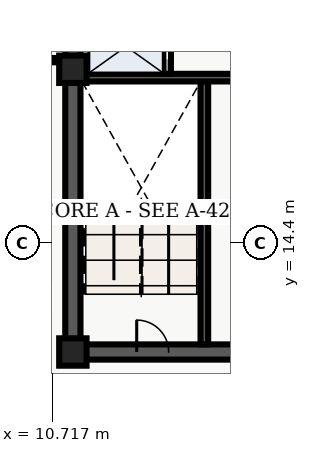
"""IFC4 building model, lengths in metres.
Left out: names, types, materials, properties, quantities, classifications, styles, units other than length and angle.
Written with IfcOpenShell. Run it as: python <this file> out.ifc"""

import sys

from ifc_helpers import new_model, entity, si_unit, converted_unit, direction, frame, origin_with_axes, origin_2d_with_axis, place, context, subcontext, project, spatial, polyline, rectangle, outline, extrude, element, fill, save


model = new_model("IFC4")
c1 = context("Model", 3, precision=1e-05, world=origin_with_axes(), true_north=direction((0.0, 1.0)))
c2 = subcontext(c1, "Body", "Model", "MODEL_VIEW")
j1 = project(units=[si_unit("LENGTHUNIT", "METRE"), converted_unit("PLANEANGLEUNIT", "DEGREE", entity("IfcPlaneAngleMeasure", 0.017), si_unit("PLANEANGLEUNIT", "RADIAN"), dimensions=[0, 0, 0, 0, 0, 0, 0])], contexts=[c1])
p1 = place(None, origin_with_axes())
s1 = spatial("IfcSite", under=j1, at=p1, CompositionType="ELEMENT")
p2 = place(p1, origin_with_axes())
s2 = spatial("IfcBuilding", under=s1, at=p2, CompositionType="ELEMENT")
p3 = place(p2, frame((0.0, 0.0, 200.4), z_axis=(0.0, 0.0, 1.0), x_axis=(1.0, 0.0, 0.0)))
s3 = spatial("IfcBuildingStorey", under=s2, at=p3, CompositionType="ELEMENT", Elevation=200.4)
p4 = place(p3, frame((11.4, 10.8, 0.0), z_axis=(0.0, 0.0, 1.0), x_axis=(0.0, 1.0, 0.0)))
e1 = element("IfcWall", 1, at=p4, inside=s3, PredefinedType="SHEAR", context=c2, shape_type="SweptSolid", body=[
    extrude(outline(polyline([(0.0, -0.25), (27.0, -0.25), (27.0, 0.25), (0.0, 0.25), (0.0, -0.25)])), origin_with_axes(), (0.0, 0.0, 1.0), 3.66),
])
p5 = place(p3, frame((11.4, 10.8, 0.0), z_axis=(0.0, 0.0, 1.0), x_axis=(1.0, 0.0, 0.0)))
e2 = element("IfcWall", 2, at=p5, inside=s3, PredefinedType="SHEAR", context=c2, shape_type="SweptSolid", body=[
    extrude(outline(polyline([(0.0, -0.25), (7.2, -0.25), (7.2, 0.25), (0.0, 0.25), (0.0, -0.25)])), origin_with_axes(), (0.0, 0.0, 1.0), 3.66),
])
p6 = place(p5, frame((2.625, 0.0, 0.0), z_axis=(0.0, 0.0, 1.0), x_axis=(1.0, 0.0, 0.0)))
e3 = element("IfcOpeningElement", 3, at=p6, cuts=e2, PredefinedType="OPENING", context=c2, shape_type="SweptSolid", body=[
    extrude(rectangle(XDim=1.05, YDim=0.52, at=origin_2d_with_axis()), origin_with_axes(), (0.0, 0.0, 1.0), 2.15),
])
p7 = place(p3, frame((15.725, 11.05, 0.0), z_axis=(0.0, 0.0, 1.0), x_axis=(0.0, 1.0, 0.0)))
e4 = element("IfcWall", 4, at=p7, inside=s3, PredefinedType="SHEAR", context=c2, shape_type="SweptSolid", body=[
    extrude(outline(polyline([(0.0, -0.125), (8.65, -0.125), (8.65, 0.125), (0.0, 0.125), (0.0, -0.125)])), origin_with_axes(), (0.0, 0.0, 1.0), 3.66),
])
p8 = place(p3, frame((11.65, 19.825, 0.0), z_axis=(0.0, 0.0, 1.0), x_axis=(1.0, 0.0, 0.0)))
e5 = element("IfcWall", 5, at=p8, inside=s3, PredefinedType="SHEAR", context=c2, shape_type="SweptSolid", body=[
    extrude(outline(polyline([(0.0, -0.125), (6.7, -0.125), (6.7, 0.125), (0.0, 0.125), (0.0, -0.125)])), origin_with_axes(), (0.0, 0.0, 1.0), 3.66),
])
p9 = place(p3, frame((14.5, 19.95, 0.0), z_axis=(0.0, 0.0, 1.0), x_axis=(0.0, 1.0, 0.0)))
e6 = element("IfcWall", 6, at=p9, inside=s3, PredefinedType="SOLIDWALL", context=c2, shape_type="SweptSolid", body=[
    extrude(outline(polyline([(0.0, -0.125), (6.25, -0.125), (6.25, 0.125), (0.0, 0.125), (0.0, -0.125)])), origin_with_axes(), (0.0, 0.0, 1.0), 2.7),
])
p10 = place(p9, frame((1.025, 0.0, 0.0), z_axis=(0.0, 0.0, 1.0), x_axis=(1.0, 0.0, 0.0)))
e7 = element("IfcOpeningElement", 7, at=p10, cuts=e6, PredefinedType="OPENING", context=c2, shape_type="SweptSolid", body=[
    extrude(rectangle(XDim=1.1, YDim=0.27, at=origin_2d_with_axis()), origin_with_axes(), (0.0, 0.0, 1.0), 2.15),
])
p11 = place(p9, frame((2.975, 0.0, 0.0), z_axis=(0.0, 0.0, 1.0), x_axis=(1.0, 0.0, 0.0)))
e8 = element("IfcOpeningElement", 8, at=p11, cuts=e6, PredefinedType="OPENING", context=c2, shape_type="SweptSolid", body=[
    extrude(rectangle(XDim=1.1, YDim=0.27, at=origin_2d_with_axis()), origin_with_axes(), (0.0, 0.0, 1.0), 2.15),
])
p12 = place(p9, frame((5.425, 0.0, 0.0), z_axis=(0.0, 0.0, 1.0), x_axis=(1.0, 0.0, 0.0)))
e9 = element("IfcOpeningElement", 9, at=p12, cuts=e6, PredefinedType="OPENING", context=c2, shape_type="SweptSolid", body=[
    extrude(rectangle(XDim=1.2, YDim=0.27, at=origin_2d_with_axis()), origin_with_axes(), (0.0, 0.0, 1.0), 2.15),
])
for number, where, z_axis, x_axis in (
    (10, (11.4, 10.8, 0.0), (0.0, 0.0, 1.0), (1.0, 0.0, 0.0)),
    (11, (11.4, 20.1, 0.0), (0.0, 0.0, 1.0), (1.0, 0.0, 0.0)),
):
    element("IfcColumn", number, at=place(p3, frame(where, z_axis=z_axis, x_axis=x_axis)), inside=s3, PredefinedType="COLUMN", context=c2, shape_type="SweptSolid", body=[
        extrude(rectangle(XDim=0.9, YDim=0.9, at=origin_2d_with_axis()), origin_with_axes(), (0.0, 0.0, 1.0), 3.9),
    ])
p13 = place(p3, frame((9.52, 20.4, 0.0), z_axis=(0.0, 0.0, 1.0), x_axis=(1.0, 0.0, 0.0)))
e12 = element("IfcWall", 12, at=p13, inside=s3, PredefinedType="PARTITIONING", context=c2, shape_type="SweptSolid", body=[
    extrude(outline(polyline([(0.0, -0.07), (1.58, -0.07), (1.58, 0.07), (0.0, 0.07), (0.0, -0.07)])), origin_with_axes(), (0.0, 0.0, 1.0), 2.7),
])
p14 = place(p9, frame((1.025, 0.0, 0.0), z_axis=(0.0, 0.0, 1.0), x_axis=(1.0, 0.0, 0.0)))
e13 = element("IfcDoor", 13, at=p14, inside=s3, OperationType="SLIDING_TO_LEFT", PredefinedType="DOOR", context=c2, shape_type="SweptSolid", body=[
    extrude(rectangle(XDim=1.1, YDim=0.09, at=origin_2d_with_axis()), origin_with_axes(), (0.0, 0.0, 1.0), 2.15),
])
fill(e7, e13)
p15 = place(p5, frame((2.625, 0.0, 0.0), z_axis=(0.0, 0.0, 1.0), x_axis=(1.0, 0.0, 0.0)))
e14 = element("IfcDoor", 14, at=p15, inside=s3, OperationType="SINGLE_SWING_LEFT", PredefinedType="DOOR", context=c2, shape_type="SweptSolid", body=[
    extrude(rectangle(XDim=1.05, YDim=0.09, at=origin_2d_with_axis()), origin_with_axes(), (0.0, 0.0, 1.0), 2.15),
])
fill(e3, e14)
save(model, sys.argv[1])
